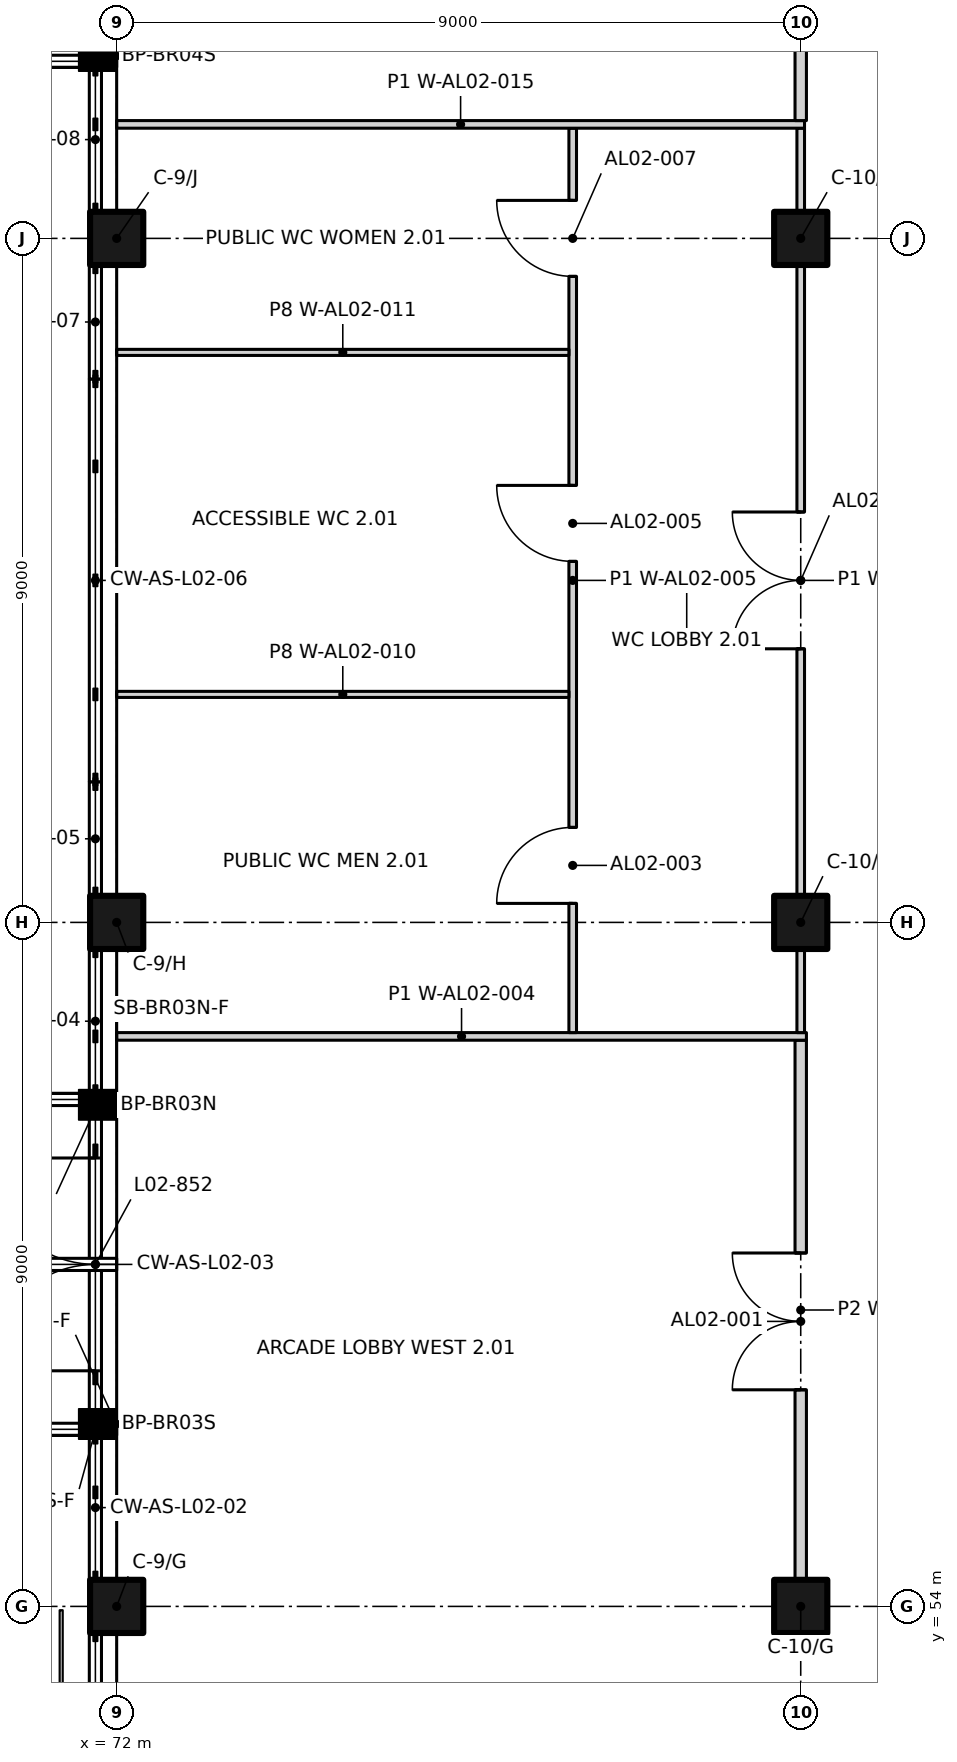
"""IFC4 building model, lengths in metres.
Left out: names, types, materials, properties, quantities, classifications, styles, units other than length and angle.
Written with IfcOpenShell. Run it as: python <this file> out.ifc"""

import sys

from ifc_helpers import new_model, si_unit, direction, frame, frame_2d, origin, origin_2d, place, context, subcontext, project, spatial, rectangle, extrude, element, fill, save


model = new_model("IFC4")
c1 = context("Model", 3, precision=1e-05, world=origin(), true_north=direction((0.0, 1.0)))
c2 = subcontext(c1, "Body", "Model", "MODEL_VIEW")
j1 = project(units=[si_unit("LENGTHUNIT", "METRE"), si_unit("PLANEANGLEUNIT", "RADIAN")], contexts=[c1])
p1 = place(None, origin())
s1 = spatial("IfcSite", under=j1, at=p1, CompositionType="ELEMENT")
p2 = place(p1, origin())
s2 = spatial("IfcBuilding", under=s1, at=p2, CompositionType="ELEMENT")
p3 = place(p2, frame((0.0, 0.0, 10.5)))
s3 = spatial("IfcBuildingStorey", under=s2, at=p3, CompositionType="ELEMENT", Elevation=10.5)
for number, where, z_axis, x_axis in (
    (1, (72.0, 54.0, 0.0), (0.0, 0.0, 1.0), (1.0, 0.0, 0.0)),
    (2, (81.0, 54.0, 0.0), (0.0, 0.0, 1.0), (1.0, 0.0, 0.0)),
    (3, (72.0, 63.0, 0.0), (0.0, 0.0, 1.0), (1.0, 0.0, 0.0)),
    (4, (81.0, 63.0, 0.0), (0.0, 0.0, 1.0), (1.0, 0.0, 0.0)),
    (5, (72.0, 72.0, 0.0), (0.0, 0.0, 1.0), (1.0, 0.0, 0.0)),
    (6, (81.0, 72.0, 0.0), (0.0, 0.0, 1.0), (1.0, 0.0, 0.0)),
):
    element("IfcColumn", number, at=place(p3, frame(where, z_axis=z_axis, x_axis=x_axis)), inside=s3, PredefinedType="COLUMN", context=c2, shape_type="SweptSolid", body=[
        extrude(rectangle(XDim=0.7, YDim=0.7, at=origin_2d()), origin(), (0.0, 0.0, 1.0), 4.5),
    ])
p4 = place(p3, frame((71.72, 57.03, 0.0), z_axis=(0.0, 0.0, 1.0), x_axis=(0.0, 1.0, 0.0)))
e7 = element("IfcWall", 7, at=p4, inside=s3, PredefinedType="STANDARD", context=c2, shape_type="SweptSolid", body=[
    extrude(rectangle(XDim=2.94, YDim=0.12, at=frame_2d((1.47, 0.0))), origin(), (0.0, 0.0, 1.0), 2.97),
])
p5 = place(p4, frame((0.07, 0.0, 0.0)))
e8 = element("IfcOpeningElement", 8, at=p5, cuts=e7, PredefinedType="OPENING", context=c2, shape_type="SweptSolid", body=[
    extrude(rectangle(XDim=2.8, YDim=2.4, at=frame_2d((1.4, 1.2))), frame((0.0, 0.07, 0.0), z_axis=(0.0, -1.0, 0.0), x_axis=(1.0, 0.0, 0.0)), (0.0, 0.0, 1.0), 0.14),
])
p6 = place(p3, frame((81.0, 54.35, 0.0), z_axis=(0.0, 0.0, 1.0), x_axis=(0.0, 1.0, 0.0)))
e9 = element("IfcWall", 9, at=p6, inside=s3, PredefinedType="PARTITIONING", context=c2, shape_type="SweptSolid", body=[
    extrude(rectangle(XDim=7.1, YDim=0.15, at=frame_2d((3.55, 0.0))), origin(), (0.0, 0.0, 1.0), 3.7),
])
p7 = place(p6, frame((2.5, 0.0, 0.0)))
e10 = element("IfcOpeningElement", 10, at=p7, cuts=e9, PredefinedType="OPENING", context=c2, shape_type="SweptSolid", body=[
    extrude(rectangle(XDim=1.8, YDim=2.1, at=frame_2d((0.9, 1.05))), frame((0.0, 0.085, 0.0), z_axis=(0.0, -1.0, 0.0), x_axis=(1.0, 0.0, 0.0)), (0.0, 0.0, 1.0), 0.17),
])
p8 = place(p3, frame((72.0, 61.5, 0.0), z_axis=(0.0, 0.0, 1.0), x_axis=(1.0, 0.0, 0.0)))
e11 = element("IfcWall", 11, at=p8, inside=s3, PredefinedType="PARTITIONING", context=c2, shape_type="SweptSolid", body=[
    extrude(rectangle(XDim=9.075, YDim=0.1, at=frame_2d((4.538, 0.0))), origin(), (0.0, 0.0, 1.0), 3.65),
])
p9 = place(p3, frame((78.0, 61.55, 0.0), z_axis=(0.0, 0.0, 1.0), x_axis=(0.0, 1.0, 0.0)))
e12 = element("IfcWall", 12, at=p9, inside=s3, PredefinedType="PARTITIONING", context=c2, shape_type="SweptSolid", body=[
    extrude(rectangle(XDim=11.9, YDim=0.1, at=frame_2d((5.95, 0.0))), origin(), (0.0, 0.0, 1.0), 4.15),
])
p10 = place(p9, frame((1.7, 0.0, 0.0)))
e13 = element("IfcOpeningElement", 13, at=p10, cuts=e12, PredefinedType="OPENING", context=c2, shape_type="SweptSolid", body=[
    extrude(rectangle(XDim=1.0, YDim=2.1, at=frame_2d((0.5, 1.05))), frame((0.0, 0.06, 0.0), z_axis=(0.0, -1.0, 0.0), x_axis=(1.0, 0.0, 0.0)), (0.0, 0.0, 1.0), 0.12),
])
p11 = place(p9, frame((6.2, 0.0, 0.0)))
e14 = element("IfcOpeningElement", 14, at=p11, cuts=e12, PredefinedType="OPENING", context=c2, shape_type="SweptSolid", body=[
    extrude(rectangle(XDim=1.0, YDim=2.1, at=frame_2d((0.5, 1.05))), frame((0.0, 0.06, 0.0), z_axis=(0.0, -1.0, 0.0), x_axis=(1.0, 0.0, 0.0)), (0.0, 0.0, 1.0), 0.12),
])
p12 = place(p9, frame((9.95, 0.0, 0.0)))
e15 = element("IfcOpeningElement", 15, at=p12, cuts=e12, PredefinedType="OPENING", context=c2, shape_type="SweptSolid", body=[
    extrude(rectangle(XDim=1.0, YDim=2.1, at=frame_2d((0.5, 1.05))), frame((0.0, 0.06, 0.0), z_axis=(0.0, -1.0, 0.0), x_axis=(1.0, 0.0, 0.0)), (0.0, 0.0, 1.0), 0.12),
])
p13 = place(p3, frame((81.0, 61.55, 0.0), z_axis=(0.0, 0.0, 1.0), x_axis=(0.0, 1.0, 0.0)))
e16 = element("IfcWall", 16, at=p13, inside=s3, PredefinedType="PARTITIONING", context=c2, shape_type="SweptSolid", body=[
    extrude(rectangle(XDim=1.1, YDim=0.1, at=frame_2d((0.55, 0.0))), origin(), (0.0, 0.0, 1.0), 3.7),
])
p14 = place(p3, frame((81.0, 63.35, 0.0), z_axis=(0.0, 0.0, 1.0), x_axis=(0.0, 1.0, 0.0)))
e17 = element("IfcWall", 17, at=p14, inside=s3, PredefinedType="PARTITIONING", context=c2, shape_type="SweptSolid", body=[
    extrude(rectangle(XDim=8.3, YDim=0.1, at=frame_2d((4.15, 0.0))), origin(), (0.0, 0.0, 1.0), 3.7),
])
p15 = place(p14, frame((3.25, 0.0, 0.0)))
e18 = element("IfcOpeningElement", 18, at=p15, cuts=e17, PredefinedType="OPENING", context=c2, shape_type="SweptSolid", body=[
    extrude(rectangle(XDim=1.8, YDim=2.1, at=frame_2d((0.9, 1.05))), frame((0.0, 0.06, 0.0), z_axis=(0.0, -1.0, 0.0), x_axis=(1.0, 0.0, 0.0)), (0.0, 0.0, 1.0), 0.12),
])
for number, where, z_axis, x_axis in (
    (19, (72.0, 66.0, 0.0), (0.0, 0.0, 1.0), (1.0, 0.0, 0.0)),
    (20, (72.0, 70.5, 0.0), (0.0, 0.0, 1.0), (1.0, 0.0, 0.0)),
):
    element("IfcWall", number, at=place(p3, frame(where, z_axis=z_axis, x_axis=x_axis)), inside=s3, PredefinedType="PARTITIONING", context=c2, shape_type="SweptSolid", body=[
        extrude(rectangle(XDim=5.95, YDim=0.08, at=frame_2d((2.975, 0.0))), origin(), (0.0, 0.0, 1.0), 3.45),
    ])
p16 = place(p3, frame((81.0, 72.35, 0.0), z_axis=(0.0, 0.0, 1.0), x_axis=(0.0, 1.0, 0.0)))
e21 = element("IfcWall", 21, at=p16, inside=s3, PredefinedType="PARTITIONING", context=c2, shape_type="SweptSolid", body=[
    extrude(rectangle(XDim=1.1, YDim=0.1, at=frame_2d((0.55, 0.0))), origin(), (0.0, 0.0, 1.0), 3.7),
])
p17 = place(p3, frame((72.0, 73.5, 0.0), z_axis=(0.0, 0.0, 1.0), x_axis=(1.0, 0.0, 0.0)))
e22 = element("IfcWall", 22, at=p17, inside=s3, PredefinedType="PARTITIONING", context=c2, shape_type="SweptSolid", body=[
    extrude(rectangle(XDim=9.05, YDim=0.1, at=frame_2d((4.525, 0.0))), origin(), (0.0, 0.0, 1.0), 3.65),
])
p18 = place(p3, frame((81.0, 73.55, 0.0), z_axis=(0.0, 0.0, 1.0), x_axis=(0.0, 1.0, 0.0)))
e23 = element("IfcWall", 23, at=p18, inside=s3, PredefinedType="PARTITIONING", context=c2, shape_type="SweptSolid", body=[
    extrude(rectangle(XDim=7.1, YDim=0.15, at=frame_2d((3.55, 0.0))), origin(), (0.0, 0.0, 1.0), 3.7),
])
p19 = place(p5, origin())
e24 = element("IfcDoor", 24, at=p19, inside=s3, OperationType="DOUBLE_DOOR_SINGLE_SWING", PredefinedType="DOOR", context=c2, shape_type="SweptSolid", body=[
    extrude(rectangle(XDim=2.8, YDim=2.4, at=frame_2d((1.4, 1.2))), frame((0.0, 0.025, 0.0), z_axis=(0.0, -1.0, 0.0), x_axis=(1.0, 0.0, 0.0)), (0.0, 0.0, 1.0), 0.05),
])
fill(e8, e24)
p20 = place(p7, origin())
e25 = element("IfcDoor", 25, at=p20, inside=s3, OperationType="DOUBLE_DOOR_SINGLE_SWING", PredefinedType="DOOR", context=c2, shape_type="SweptSolid", body=[
    extrude(rectangle(XDim=1.8, YDim=2.1, at=frame_2d((0.9, 1.05))), frame((0.0, 0.025, 0.0), z_axis=(0.0, -1.0, 0.0), x_axis=(1.0, 0.0, 0.0)), (0.0, 0.0, 1.0), 0.05),
])
fill(e10, e25)
p21 = place(p10, origin())
e26 = element("IfcDoor", 26, at=p21, inside=s3, OperationType="SINGLE_SWING_LEFT", PredefinedType="DOOR", context=c2, shape_type="SweptSolid", body=[
    extrude(rectangle(XDim=1.0, YDim=2.1, at=frame_2d((0.5, 1.05))), frame((0.0, 0.025, 0.0), z_axis=(0.0, -1.0, 0.0), x_axis=(1.0, 0.0, 0.0)), (0.0, 0.0, 1.0), 0.05),
])
fill(e13, e26)
p22 = place(p15, origin())
e27 = element("IfcDoor", 27, at=p22, inside=s3, OperationType="DOUBLE_DOOR_SINGLE_SWING", PredefinedType="DOOR", context=c2, shape_type="SweptSolid", body=[
    extrude(rectangle(XDim=1.8, YDim=2.1, at=frame_2d((0.9, 1.05))), frame((0.0, 0.025, 0.0), z_axis=(0.0, -1.0, 0.0), x_axis=(1.0, 0.0, 0.0)), (0.0, 0.0, 1.0), 0.05),
])
fill(e18, e27)
p23 = place(p11, origin())
e28 = element("IfcDoor", 28, at=p23, inside=s3, OperationType="SINGLE_SWING_RIGHT", PredefinedType="DOOR", context=c2, shape_type="SweptSolid", body=[
    extrude(rectangle(XDim=1.0, YDim=2.1, at=frame_2d((0.5, 1.05))), frame((0.0, 0.025, 0.0), z_axis=(0.0, -1.0, 0.0), x_axis=(1.0, 0.0, 0.0)), (0.0, 0.0, 1.0), 0.05),
])
fill(e14, e28)
p24 = place(p12, origin())
e29 = element("IfcDoor", 29, at=p24, inside=s3, OperationType="SINGLE_SWING_RIGHT", PredefinedType="DOOR", context=c2, shape_type="SweptSolid", body=[
    extrude(rectangle(XDim=1.0, YDim=2.1, at=frame_2d((0.5, 1.05))), frame((0.0, 0.025, 0.0), z_axis=(0.0, -1.0, 0.0), x_axis=(1.0, 0.0, 0.0)), (0.0, 0.0, 1.0), 0.05),
])
fill(e15, e29)
save(model, sys.argv[1])
